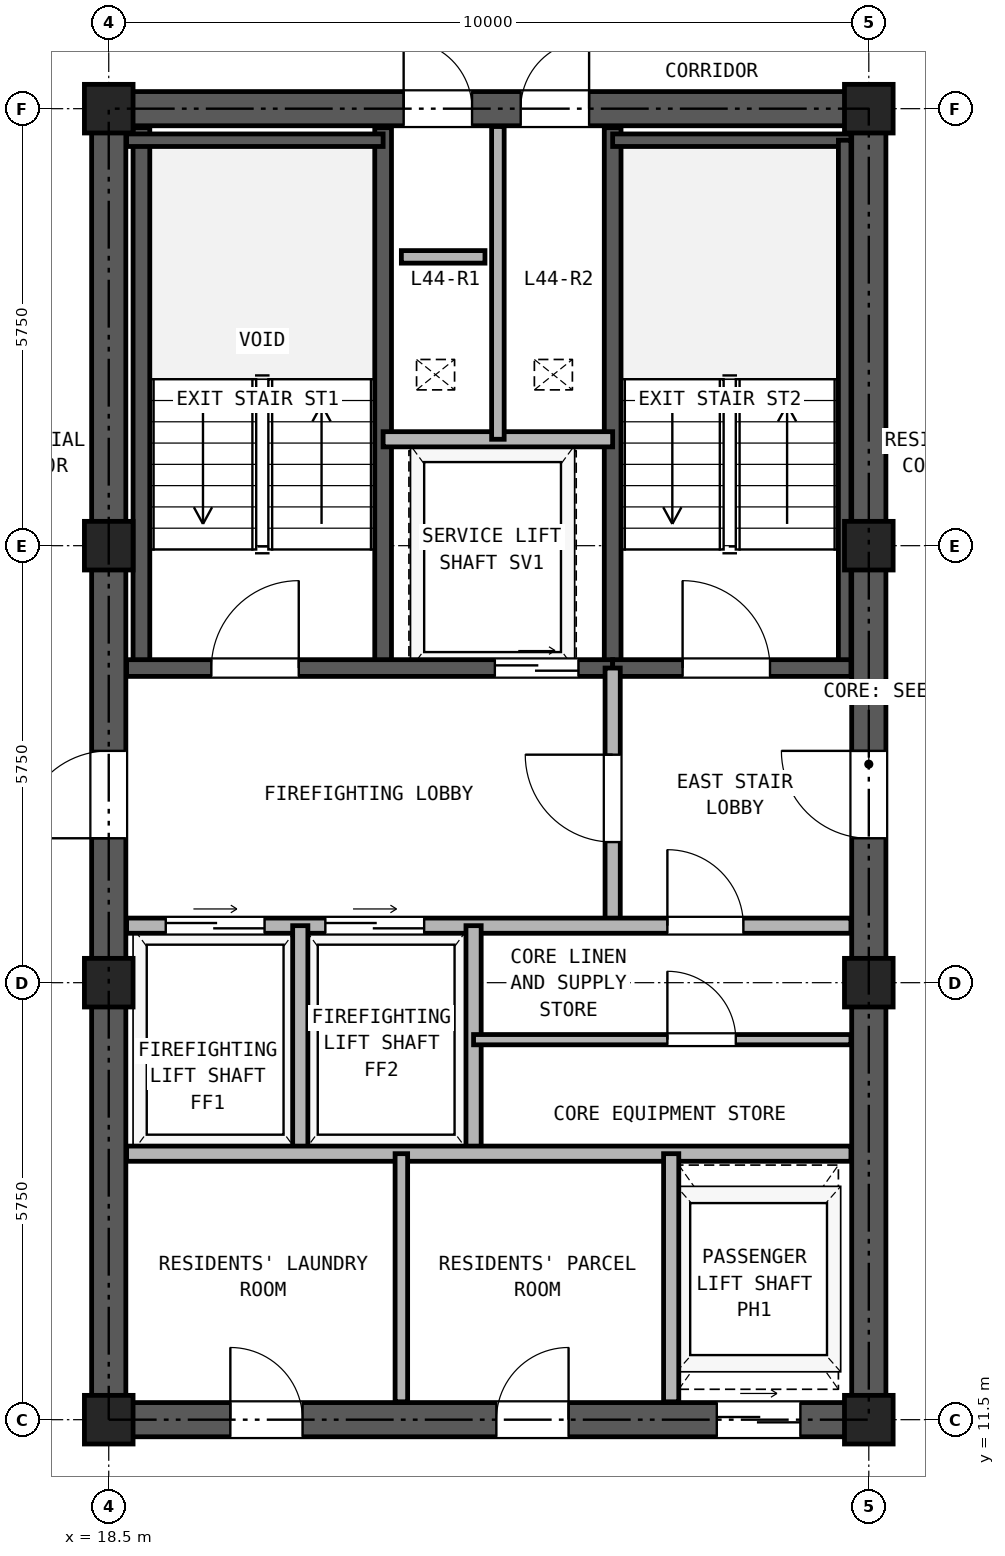
"""IFC4 building model, lengths in metres.
Left out: names, types, materials, properties, quantities, classifications, styles, units other than length and angle.
Written with IfcOpenShell. Run it as: python <this file> out.ifc"""

import sys

from ifc_helpers import new_model, si_unit, direction, frame, frame_2d, origin, origin_2d, place, context, subcontext, project, spatial, rectangle, hollow_rectangle, extrude, source, transform, mapped, element, fill, save


model = new_model("IFC4")
c1 = context("Model", 3, precision=1e-05, world=origin(), true_north=direction((0.0, 1.0)))
c2 = subcontext(c1, "Body", "Model", "MODEL_VIEW")
j1 = project(units=[si_unit("LENGTHUNIT", "METRE"), si_unit("PLANEANGLEUNIT", "RADIAN")], contexts=[c1])
p1 = place(None, origin())
s1 = spatial("IfcSite", under=j1, at=p1, CompositionType="ELEMENT")
p2 = place(p1, origin())
s2 = spatial("IfcBuilding", under=s1, at=p2, CompositionType="ELEMENT")
p3 = place(p2, frame((0.0, 0.0, 159.3)))
s3 = spatial("IfcBuildingStorey", under=s2, at=p3, CompositionType="ELEMENT", Elevation=159.3)
m1 = source(origin(), c2, "Body", "SweptSolid", [
    extrude(hollow_rectangle(XDim=0.64, YDim=0.64, WallThickness=0.035, at=origin_2d()), origin(), (0.0, 0.0, 1.0), 2.95),
])
for number, where, z_axis, x_axis in (
    (1, (18.5, 11.5, 0.0), (0.0, 0.0, 1.0), (1.0, 0.0, 0.0)),
    (2, (18.5, 17.25, 0.0), (0.0, 0.0, 1.0), (1.0, 0.0, 0.0)),
    (3, (18.5, 23.0, 0.0), (0.0, 0.0, 1.0), (1.0, 0.0, 0.0)),
    (4, (18.5, 28.75, 0.0), (0.0, 0.0, 1.0), (1.0, 0.0, 0.0)),
    (5, (28.5, 11.5, 0.0), (0.0, 0.0, 1.0), (1.0, 0.0, 0.0)),
    (6, (28.5, 17.25, 0.0), (0.0, 0.0, 1.0), (1.0, 0.0, 0.0)),
    (7, (28.5, 23.0, 0.0), (0.0, 0.0, 1.0), (1.0, 0.0, 0.0)),
    (8, (28.5, 28.75, 0.0), (0.0, 0.0, 1.0), (1.0, 0.0, 0.0)),
):
    element("IfcColumn", number, at=place(p3, frame(where, z_axis=z_axis, x_axis=x_axis)), inside=s3, PredefinedType="COLUMN", context=c2, shape_type="MappedRepresentation", body=[
        mapped(m1, transform((0.0, 0.0, 0.0), x_axis=(1.0, 0.0, 0.0), y_axis=(0.0, 1.0, 0.0), z_axis=(0.0, 0.0, 1.0), scale=1.0)),
    ])
p4 = place(p3, frame((18.275, 11.5, 0.0), z_axis=(0.0, 0.0, 1.0), x_axis=(1.0, 0.0, 0.0)))
e9 = element("IfcWall", 9, at=p4, inside=s3, PredefinedType="SHEAR", context=c2, shape_type="SweptSolid", body=[
    extrude(rectangle(XDim=10.45, YDim=0.45, at=frame_2d((5.225, 0.0))), origin(), (0.0, 0.0, 1.0), 2.95),
])
p5 = place(p4, frame((1.825, 0.0, 0.0)))
e10 = element("IfcOpeningElement", 10, at=p5, cuts=e9, PredefinedType="OPENING", context=c2, shape_type="SweptSolid", body=[
    extrude(rectangle(XDim=0.95, YDim=2.15, at=frame_2d((0.475, 1.075))), frame((0.0, 0.235, 0.0), z_axis=(0.0, -1.0, 0.0), x_axis=(1.0, 0.0, 0.0)), (0.0, 0.0, 1.0), 0.47),
])
p6 = place(p4, frame((5.325, 0.0, 0.0)))
e11 = element("IfcOpeningElement", 11, at=p6, cuts=e9, PredefinedType="OPENING", context=c2, shape_type="SweptSolid", body=[
    extrude(rectangle(XDim=0.95, YDim=2.15, at=frame_2d((0.475, 1.075))), frame((0.0, 0.235, 0.0), z_axis=(0.0, -1.0, 0.0), x_axis=(1.0, 0.0, 0.0)), (0.0, 0.0, 1.0), 0.47),
])
p7 = place(p4, frame((8.225, 0.0, 0.0)))
e12 = element("IfcOpeningElement", 12, at=p7, cuts=e9, PredefinedType="OPENING", context=c2, shape_type="SweptSolid", body=[
    extrude(rectangle(XDim=1.1, YDim=2.25, at=frame_2d((0.55, 1.125))), frame((0.0, 0.235, 0.0), z_axis=(0.0, -1.0, 0.0), x_axis=(1.0, 0.0, 0.0)), (0.0, 0.0, 1.0), 0.47),
])
p8 = place(p3, frame((18.275, 28.75, 0.0), z_axis=(0.0, 0.0, 1.0), x_axis=(1.0, 0.0, 0.0)))
e13 = element("IfcWall", 13, at=p8, inside=s3, PredefinedType="SHEAR", context=c2, shape_type="SweptSolid", body=[
    extrude(rectangle(XDim=10.45, YDim=0.45, at=frame_2d((5.225, 0.0))), origin(), (0.0, 0.0, 1.0), 2.95),
])
p9 = place(p8, frame((4.105, 0.0, 0.0)))
e14 = element("IfcOpeningElement", 14, at=p9, cuts=e13, PredefinedType="OPENING", context=c2, shape_type="SweptSolid", body=[
    extrude(rectangle(XDim=0.9, YDim=2.05, at=frame_2d((0.45, 1.025))), frame((0.0, 0.235, 0.0), z_axis=(0.0, -1.0, 0.0), x_axis=(1.0, 0.0, 0.0)), (0.0, 0.0, 1.0), 0.47),
])
p10 = place(p8, frame((5.645, 0.0, 0.0)))
e15 = element("IfcOpeningElement", 15, at=p10, cuts=e13, PredefinedType="OPENING", context=c2, shape_type="SweptSolid", body=[
    extrude(rectangle(XDim=0.9, YDim=2.05, at=frame_2d((0.45, 1.025))), frame((0.0, 0.235, 0.0), z_axis=(0.0, -1.0, 0.0), x_axis=(1.0, 0.0, 0.0)), (0.0, 0.0, 1.0), 0.47),
])
p11 = place(p3, frame((18.5, 11.725, 0.0), z_axis=(0.0, 0.0, 1.0), x_axis=(0.0, 1.0, 0.0)))
e16 = element("IfcWall", 16, at=p11, inside=s3, PredefinedType="SHEAR", context=c2, shape_type="SweptSolid", body=[
    extrude(rectangle(XDim=16.8, YDim=0.45, at=frame_2d((8.4, 0.0))), origin(), (0.0, 0.0, 1.0), 2.95),
])
p12 = place(p11, frame((7.425, 0.0, 0.0)))
e17 = element("IfcOpeningElement", 17, at=p12, cuts=e16, PredefinedType="OPENING", context=c2, shape_type="SweptSolid", body=[
    extrude(rectangle(XDim=1.15, YDim=2.2, at=frame_2d((0.575, 1.1))), frame((0.0, 0.235, 0.0), z_axis=(0.0, -1.0, 0.0), x_axis=(1.0, 0.0, 0.0)), (0.0, 0.0, 1.0), 0.47),
])
p13 = place(p3, frame((28.5, 11.725, 0.0), z_axis=(0.0, 0.0, 1.0), x_axis=(0.0, 1.0, 0.0)))
e18 = element("IfcWall", 18, at=p13, inside=s3, PredefinedType="SHEAR", context=c2, shape_type="SweptSolid", body=[
    extrude(rectangle(XDim=16.8, YDim=0.45, at=frame_2d((8.4, 0.0))), origin(), (0.0, 0.0, 1.0), 2.95),
])
p14 = place(p13, frame((7.425, 0.0, 0.0)))
e19 = element("IfcOpeningElement", 19, at=p14, cuts=e18, PredefinedType="OPENING", context=c2, shape_type="SweptSolid", body=[
    extrude(rectangle(XDim=1.15, YDim=2.2, at=frame_2d((0.575, 1.1))), frame((0.0, 0.235, 0.0), z_axis=(0.0, -1.0, 0.0), x_axis=(1.0, 0.0, 0.0)), (0.0, 0.0, 1.0), 0.47),
])
for number, where, z_axis, x_axis in (
    (20, (18.93, 21.39, 0.0), (0.0, 0.0, 1.0), (0.0, 1.0, 0.0)),
    (21, (22.11, 21.39, 0.0), (0.0, 0.0, 1.0), (0.0, 1.0, 0.0)),
    (22, (25.13, 21.39, 0.0), (0.0, 0.0, 1.0), (0.0, 1.0, 0.0)),
):
    element("IfcWall", number, at=place(p3, frame(where, z_axis=z_axis, x_axis=x_axis)), inside=s3, PredefinedType="SOLIDWALL", context=c2, shape_type="SweptSolid", body=[
        extrude(rectangle(XDim=7.11, YDim=0.22, at=frame_2d((3.555, 0.0))), origin(), (0.0, 0.0, 1.0), 2.95),
    ])
p15 = place(p3, frame((18.735, 28.335, 0.0), z_axis=(0.0, 0.0, 1.0), x_axis=(1.0, 0.0, 0.0)))
e23 = element("IfcWall", 23, at=p15, inside=s3, PredefinedType="PARTITIONING", context=c2, shape_type="SweptSolid", body=[
    extrude(rectangle(XDim=3.375, YDim=0.165, at=frame_2d((1.688, 0.0))), origin(), (0.0, 0.0, 1.0), 2.95),
])
p16 = place(p3, frame((25.13, 28.335, 0.0), z_axis=(0.0, 0.0, 1.0), x_axis=(1.0, 0.0, 0.0)))
e24 = element("IfcWall", 24, at=p16, inside=s3, PredefinedType="PARTITIONING", context=c2, shape_type="SweptSolid", body=[
    extrude(rectangle(XDim=3.135, YDim=0.165, at=frame_2d((1.567, 0.0))), origin(), (0.0, 0.0, 1.0), 2.95),
])
p17 = place(p3, frame((28.183, 21.39, 0.0), z_axis=(0.0, 0.0, 1.0), x_axis=(0.0, 1.0, 0.0)))
e25 = element("IfcWall", 25, at=p17, inside=s3, PredefinedType="PARTITIONING", context=c2, shape_type="SweptSolid", body=[
    extrude(rectangle(XDim=6.945, YDim=0.165, at=frame_2d((3.473, 0.0))), origin(), (0.0, 0.0, 1.0), 2.95),
])
p18 = place(p3, frame((18.735, 21.39, 0.0), z_axis=(0.0, 0.0, 1.0), x_axis=(1.0, 0.0, 0.0)))
e26 = element("IfcWall", 26, at=p18, inside=s3, PredefinedType="SOLIDWALL", context=c2, shape_type="SweptSolid", body=[
    extrude(rectangle(XDim=6.395, YDim=0.22, at=frame_2d((3.197, 0.0))), origin(), (0.0, 0.0, 1.0), 2.95),
])
p19 = place(p18, frame((1.115, 0.0, 0.0)))
e27 = element("IfcOpeningElement", 27, at=p19, cuts=e26, PredefinedType="OPENING", context=c2, shape_type="SweptSolid", body=[
    extrude(rectangle(XDim=1.15, YDim=2.2, at=frame_2d((0.575, 1.1))), frame((0.0, 0.12, 0.0), z_axis=(0.0, -1.0, 0.0), x_axis=(1.0, 0.0, 0.0)), (0.0, 0.0, 1.0), 0.24),
])
p20 = place(p18, frame((4.845, 0.0, 0.0)))
e28 = element("IfcOpeningElement", 28, at=p20, cuts=e26, PredefinedType="OPENING", context=c2, shape_type="SweptSolid", body=[
    extrude(rectangle(XDim=1.1, YDim=2.25, at=frame_2d((0.55, 1.125))), frame((0.0, 0.12, 0.0), z_axis=(0.0, -1.0, 0.0), x_axis=(1.0, 0.0, 0.0)), (0.0, 0.0, 1.0), 0.24),
])
p21 = place(p3, frame((25.13, 21.39, 0.0), z_axis=(0.0, 0.0, 1.0), x_axis=(1.0, 0.0, 0.0)))
e29 = element("IfcWall", 29, at=p21, inside=s3, PredefinedType="SOLIDWALL", context=c2, shape_type="SweptSolid", body=[
    extrude(rectangle(XDim=3.135, YDim=0.22, at=frame_2d((1.567, 0.0))), origin(), (0.0, 0.0, 1.0), 2.95),
])
p22 = place(p21, frame((0.92, 0.0, 0.0)))
e30 = element("IfcOpeningElement", 30, at=p22, cuts=e29, PredefinedType="OPENING", context=c2, shape_type="SweptSolid", body=[
    extrude(rectangle(XDim=1.15, YDim=2.2, at=frame_2d((0.575, 1.1))), frame((0.0, 0.12, 0.0), z_axis=(0.0, -1.0, 0.0), x_axis=(1.0, 0.0, 0.0)), (0.0, 0.0, 1.0), 0.24),
])
p23 = place(p3, frame((22.11, 24.4, 0.0), z_axis=(0.0, 0.0, 1.0), x_axis=(1.0, 0.0, 0.0)))
e31 = element("IfcWall", 31, at=p23, inside=s3, PredefinedType="PARTITIONING", context=c2, shape_type="SweptSolid", body=[
    extrude(rectangle(XDim=3.02, YDim=0.2, at=frame_2d((1.51, 0.0))), origin(), (0.0, 0.0, 1.0), 2.95),
])
p24 = place(p3, frame((23.62, 24.4, 0.0), z_axis=(0.0, 0.0, 1.0), x_axis=(0.0, 1.0, 0.0)))
e32 = element("IfcWall", 32, at=p24, inside=s3, PredefinedType="PARTITIONING", context=c2, shape_type="SweptSolid", body=[
    extrude(rectangle(XDim=4.115, YDim=0.165, at=frame_2d((2.058, 0.0))), origin(), (0.0, 0.0, 1.0), 2.95),
])
p25 = place(p3, frame((25.13, 18.0, 0.0), z_axis=(0.0, 0.0, 1.0), x_axis=(0.0, 1.0, 0.0)))
e33 = element("IfcWall", 33, at=p25, inside=s3, PredefinedType="PARTITIONING", context=c2, shape_type="SweptSolid", body=[
    extrude(rectangle(XDim=3.39, YDim=0.2, at=frame_2d((1.695, 0.0))), origin(), (0.0, 0.0, 1.0), 2.95),
])
p26 = place(p25, frame((1.1, 0.0, 0.0)))
e34 = element("IfcOpeningElement", 34, at=p26, cuts=e33, PredefinedType="OPENING", context=c2, shape_type="SweptSolid", body=[
    extrude(rectangle(XDim=1.15, YDim=2.2, at=frame_2d((0.575, 1.1))), frame((0.0, 0.11, 0.0), z_axis=(0.0, -1.0, 0.0), x_axis=(1.0, 0.0, 0.0)), (0.0, 0.0, 1.0), 0.22),
])
p27 = place(p3, frame((18.735, 18.0, 0.0), z_axis=(0.0, 0.0, 1.0), x_axis=(1.0, 0.0, 0.0)))
e35 = element("IfcWall", 35, at=p27, inside=s3, PredefinedType="PARTITIONING", context=c2, shape_type="SweptSolid", body=[
    extrude(rectangle(XDim=9.53, YDim=0.2, at=frame_2d((4.765, 0.0))), origin(), (0.0, 0.0, 1.0), 2.95),
])
p28 = place(p27, frame((0.515, 0.0, 0.0)))
e36 = element("IfcOpeningElement", 36, at=p28, cuts=e35, PredefinedType="OPENING", context=c2, shape_type="SweptSolid", body=[
    extrude(rectangle(XDim=1.3, YDim=2.3, at=frame_2d((0.65, 1.15))), frame((0.0, 0.11, 0.0), z_axis=(0.0, -1.0, 0.0), x_axis=(1.0, 0.0, 0.0)), (0.0, 0.0, 1.0), 0.22),
])
p29 = place(p27, frame((2.615, 0.0, 0.0)))
e37 = element("IfcOpeningElement", 37, at=p29, cuts=e35, PredefinedType="OPENING", context=c2, shape_type="SweptSolid", body=[
    extrude(rectangle(XDim=1.3, YDim=2.3, at=frame_2d((0.65, 1.15))), frame((0.0, 0.11, 0.0), z_axis=(0.0, -1.0, 0.0), x_axis=(1.0, 0.0, 0.0)), (0.0, 0.0, 1.0), 0.22),
])
p30 = place(p27, frame((7.115, 0.0, 0.0)))
e38 = element("IfcOpeningElement", 38, at=p30, cuts=e35, PredefinedType="OPENING", context=c2, shape_type="SweptSolid", body=[
    extrude(rectangle(XDim=1.0, YDim=2.15, at=frame_2d((0.5, 1.075))), frame((0.0, 0.11, 0.0), z_axis=(0.0, -1.0, 0.0), x_axis=(1.0, 0.0, 0.0)), (0.0, 0.0, 1.0), 0.22),
])
for number, where, z_axis, x_axis in (
    (39, (21.02, 15.0, 0.0), (0.0, 0.0, 1.0), (0.0, 1.0, 0.0)),
    (40, (23.3, 15.0, 0.0), (0.0, 0.0, 1.0), (0.0, 1.0, 0.0)),
):
    element("IfcWall", number, at=place(p3, frame(where, z_axis=z_axis, x_axis=x_axis)), inside=s3, PredefinedType="PARTITIONING", context=c2, shape_type="SweptSolid", body=[
        extrude(rectangle(XDim=3.0, YDim=0.2, at=frame_2d((1.5, 0.0))), origin(), (0.0, 0.0, 1.0), 2.95),
    ])
p31 = place(p3, frame((18.735, 15.0, 0.0), z_axis=(0.0, 0.0, 1.0), x_axis=(1.0, 0.0, 0.0)))
e41 = element("IfcWall", 41, at=p31, inside=s3, PredefinedType="PARTITIONING", context=c2, shape_type="SweptSolid", body=[
    extrude(rectangle(XDim=9.53, YDim=0.2, at=frame_2d((4.765, 0.0))), origin(), (0.0, 0.0, 1.0), 2.95),
])
p32 = place(p3, frame((23.3, 16.5, 0.0), z_axis=(0.0, 0.0, 1.0), x_axis=(1.0, 0.0, 0.0)))
e42 = element("IfcWall", 42, at=p32, inside=s3, PredefinedType="PARTITIONING", context=c2, shape_type="SweptSolid", body=[
    extrude(rectangle(XDim=4.965, YDim=0.135, at=frame_2d((2.482, 0.0))), origin(), (0.0, 0.0, 1.0), 2.95),
])
p33 = place(p32, frame((2.55, 0.0, 0.0)))
e43 = element("IfcOpeningElement", 43, at=p33, cuts=e42, PredefinedType="OPENING", context=c2, shape_type="SweptSolid", body=[
    extrude(rectangle(XDim=0.9, YDim=2.05, at=frame_2d((0.45, 1.025))), frame((0.0, 0.077, 0.0), z_axis=(0.0, -1.0, 0.0), x_axis=(1.0, 0.0, 0.0)), (0.0, 0.0, 1.0), 0.155),
])
p34 = place(p3, frame((22.35, 11.735, 0.0), z_axis=(0.0, 0.0, 1.0), x_axis=(0.0, 1.0, 0.0)))
e44 = element("IfcWall", 44, at=p34, inside=s3, PredefinedType="PARTITIONING", context=c2, shape_type="SweptSolid", body=[
    extrude(rectangle(XDim=3.265, YDim=0.165, at=frame_2d((1.632, 0.0))), origin(), (0.0, 0.0, 1.0), 2.95),
])
p35 = place(p3, frame((25.9, 11.735, 0.0), z_axis=(0.0, 0.0, 1.0), x_axis=(0.0, 1.0, 0.0)))
e45 = element("IfcWall", 45, at=p35, inside=s3, PredefinedType="PARTITIONING", context=c2, shape_type="SweptSolid", body=[
    extrude(rectangle(XDim=3.265, YDim=0.2, at=frame_2d((1.632, 0.0))), origin(), (0.0, 0.0, 1.0), 2.95),
])
p36 = place(p3, frame((22.35, 26.8, 0.0), z_axis=(0.0, 0.0, 1.0), x_axis=(1.0, 0.0, 0.0)))
e46 = element("IfcWall", 46, at=p36, inside=s3, PredefinedType="PARTITIONING", context=c2, shape_type="SweptSolid", body=[
    extrude(rectangle(XDim=1.1, YDim=0.165, at=frame_2d((0.55, 0.0))), origin(), (0.0, 0.0, 1.0), 2.95),
])
p37 = place(p19, frame((1.15, 0.0, 0.0), z_axis=(0.0, 0.0, 1.0), x_axis=(-1.0, 0.0, 0.0)))
e47 = element("IfcDoor", 47, at=p37, inside=s3, OperationType="SINGLE_SWING_RIGHT", PredefinedType="DOOR", context=c2, shape_type="SweptSolid", body=[
    extrude(rectangle(XDim=1.15, YDim=2.2, at=frame_2d((0.575, 1.1))), frame((0.0, 0.025, 0.0), z_axis=(0.0, -1.0, 0.0), x_axis=(1.0, 0.0, 0.0)), (0.0, 0.0, 1.0), 0.05),
])
fill(e27, e47)
p38 = place(p22, frame((1.15, 0.0, 0.0), z_axis=(0.0, 0.0, 1.0), x_axis=(-1.0, 0.0, 0.0)))
e48 = element("IfcDoor", 48, at=p38, inside=s3, OperationType="SINGLE_SWING_LEFT", PredefinedType="DOOR", context=c2, shape_type="SweptSolid", body=[
    extrude(rectangle(XDim=1.15, YDim=2.2, at=frame_2d((0.575, 1.1))), frame((0.0, 0.025, 0.0), z_axis=(0.0, -1.0, 0.0), x_axis=(1.0, 0.0, 0.0)), (0.0, 0.0, 1.0), 0.05),
])
fill(e30, e48)
p39 = place(p20, frame((1.1, 0.0, 0.0), z_axis=(0.0, 0.0, 1.0), x_axis=(-1.0, 0.0, 0.0)))
e49 = element("IfcDoor", 49, at=p39, inside=s3, OperationType="DOUBLE_DOOR_SLIDING", PredefinedType="DOOR", context=c2, shape_type="SweptSolid", body=[
    extrude(rectangle(XDim=1.1, YDim=2.25, at=frame_2d((0.55, 1.125))), frame((0.0, 0.025, 0.0), z_axis=(0.0, -1.0, 0.0), x_axis=(1.0, 0.0, 0.0)), (0.0, 0.0, 1.0), 0.05),
])
fill(e28, e49)
p40 = place(p26, origin())
e50 = element("IfcDoor", 50, at=p40, inside=s3, OperationType="SINGLE_SWING_RIGHT", PredefinedType="DOOR", context=c2, shape_type="SweptSolid", body=[
    extrude(rectangle(XDim=1.15, YDim=2.2, at=frame_2d((0.575, 1.1))), frame((0.0, 0.025, 0.0), z_axis=(0.0, -1.0, 0.0), x_axis=(1.0, 0.0, 0.0)), (0.0, 0.0, 1.0), 0.05),
])
fill(e34, e50)
p41 = place(p28, origin())
e51 = element("IfcDoor", 51, at=p41, inside=s3, OperationType="DOUBLE_DOOR_SLIDING", PredefinedType="DOOR", context=c2, shape_type="SweptSolid", body=[
    extrude(rectangle(XDim=1.3, YDim=2.3, at=frame_2d((0.65, 1.15))), frame((0.0, 0.025, 0.0), z_axis=(0.0, -1.0, 0.0), x_axis=(1.0, 0.0, 0.0)), (0.0, 0.0, 1.0), 0.05),
])
fill(e36, e51)
p42 = place(p29, origin())
e52 = element("IfcDoor", 52, at=p42, inside=s3, OperationType="DOUBLE_DOOR_SLIDING", PredefinedType="DOOR", context=c2, shape_type="SweptSolid", body=[
    extrude(rectangle(XDim=1.3, YDim=2.3, at=frame_2d((0.65, 1.15))), frame((0.0, 0.025, 0.0), z_axis=(0.0, -1.0, 0.0), x_axis=(1.0, 0.0, 0.0)), (0.0, 0.0, 1.0), 0.05),
])
fill(e37, e52)
p43 = place(p30, frame((1.0, 0.0, 0.0), z_axis=(0.0, 0.0, 1.0), x_axis=(-1.0, 0.0, 0.0)))
e53 = element("IfcDoor", 53, at=p43, inside=s3, OperationType="SINGLE_SWING_LEFT", PredefinedType="DOOR", context=c2, shape_type="SweptSolid", body=[
    extrude(rectangle(XDim=1.0, YDim=2.15, at=frame_2d((0.5, 1.075))), frame((0.0, 0.025, 0.0), z_axis=(0.0, -1.0, 0.0), x_axis=(1.0, 0.0, 0.0)), (0.0, 0.0, 1.0), 0.05),
])
fill(e38, e53)
p44 = place(p33, frame((0.9, 0.0, 0.0), z_axis=(0.0, 0.0, 1.0), x_axis=(-1.0, 0.0, 0.0)))
e54 = element("IfcDoor", 54, at=p44, inside=s3, OperationType="SINGLE_SWING_LEFT", PredefinedType="DOOR", context=c2, shape_type="SweptSolid", body=[
    extrude(rectangle(XDim=0.9, YDim=2.05, at=frame_2d((0.45, 1.025))), frame((0.0, 0.025, 0.0), z_axis=(0.0, -1.0, 0.0), x_axis=(1.0, 0.0, 0.0)), (0.0, 0.0, 1.0), 0.05),
])
fill(e43, e54)
p45 = place(p12, frame((1.15, 0.0, 0.0), z_axis=(0.0, 0.0, 1.0), x_axis=(-1.0, 0.0, 0.0)))
e55 = element("IfcDoor", 55, at=p45, inside=s3, OperationType="SINGLE_SWING_LEFT", PredefinedType="DOOR", context=c2, shape_type="SweptSolid", body=[
    extrude(rectangle(XDim=1.15, YDim=2.2, at=frame_2d((0.575, 1.1))), frame((0.0, 0.025, 0.0), z_axis=(0.0, -1.0, 0.0), x_axis=(1.0, 0.0, 0.0)), (0.0, 0.0, 1.0), 0.05),
])
fill(e17, e55)
p46 = place(p14, origin())
e56 = element("IfcDoor", 56, at=p46, inside=s3, OperationType="SINGLE_SWING_RIGHT", PredefinedType="DOOR", context=c2, shape_type="SweptSolid", body=[
    extrude(rectangle(XDim=1.15, YDim=2.2, at=frame_2d((0.575, 1.1))), frame((0.0, 0.025, 0.0), z_axis=(0.0, -1.0, 0.0), x_axis=(1.0, 0.0, 0.0)), (0.0, 0.0, 1.0), 0.05),
])
fill(e19, e56)
p47 = place(p9, origin())
e57 = element("IfcDoor", 57, at=p47, inside=s3, OperationType="SINGLE_SWING_LEFT", PredefinedType="DOOR", context=c2, shape_type="SweptSolid", body=[
    extrude(rectangle(XDim=0.9, YDim=2.05, at=frame_2d((0.45, 1.025))), frame((0.0, 0.025, 0.0), z_axis=(0.0, -1.0, 0.0), x_axis=(1.0, 0.0, 0.0)), (0.0, 0.0, 1.0), 0.05),
])
fill(e14, e57)
p48 = place(p10, origin())
e58 = element("IfcDoor", 58, at=p48, inside=s3, OperationType="SINGLE_SWING_RIGHT", PredefinedType="DOOR", context=c2, shape_type="SweptSolid", body=[
    extrude(rectangle(XDim=0.9, YDim=2.05, at=frame_2d((0.45, 1.025))), frame((0.0, 0.025, 0.0), z_axis=(0.0, -1.0, 0.0), x_axis=(1.0, 0.0, 0.0)), (0.0, 0.0, 1.0), 0.05),
])
fill(e15, e58)
p49 = place(p5, frame((0.95, 0.0, 0.0), z_axis=(0.0, 0.0, 1.0), x_axis=(-1.0, 0.0, 0.0)))
e59 = element("IfcDoor", 59, at=p49, inside=s3, OperationType="SINGLE_SWING_LEFT", PredefinedType="DOOR", context=c2, shape_type="SweptSolid", body=[
    extrude(rectangle(XDim=0.95, YDim=2.15, at=frame_2d((0.475, 1.075))), frame((0.0, 0.025, 0.0), z_axis=(0.0, -1.0, 0.0), x_axis=(1.0, 0.0, 0.0)), (0.0, 0.0, 1.0), 0.05),
])
fill(e10, e59)
p50 = place(p6, frame((0.95, 0.0, 0.0), z_axis=(0.0, 0.0, 1.0), x_axis=(-1.0, 0.0, 0.0)))
e60 = element("IfcDoor", 60, at=p50, inside=s3, OperationType="SINGLE_SWING_RIGHT", PredefinedType="DOOR", context=c2, shape_type="SweptSolid", body=[
    extrude(rectangle(XDim=0.95, YDim=2.15, at=frame_2d((0.475, 1.075))), frame((0.0, 0.025, 0.0), z_axis=(0.0, -1.0, 0.0), x_axis=(1.0, 0.0, 0.0)), (0.0, 0.0, 1.0), 0.05),
])
fill(e11, e60)
p51 = place(p7, frame((1.1, 0.0, 0.0), z_axis=(0.0, 0.0, 1.0), x_axis=(-1.0, 0.0, 0.0)))
e61 = element("IfcDoor", 61, at=p51, inside=s3, OperationType="DOUBLE_DOOR_SLIDING", PredefinedType="DOOR", context=c2, shape_type="SweptSolid", body=[
    extrude(rectangle(XDim=1.1, YDim=2.25, at=frame_2d((0.55, 1.125))), frame((0.0, 0.025, 0.0), z_axis=(0.0, -1.0, 0.0), x_axis=(1.0, 0.0, 0.0)), (0.0, 0.0, 1.0), 0.05),
])
fill(e12, e61)
save(model, sys.argv[1])
